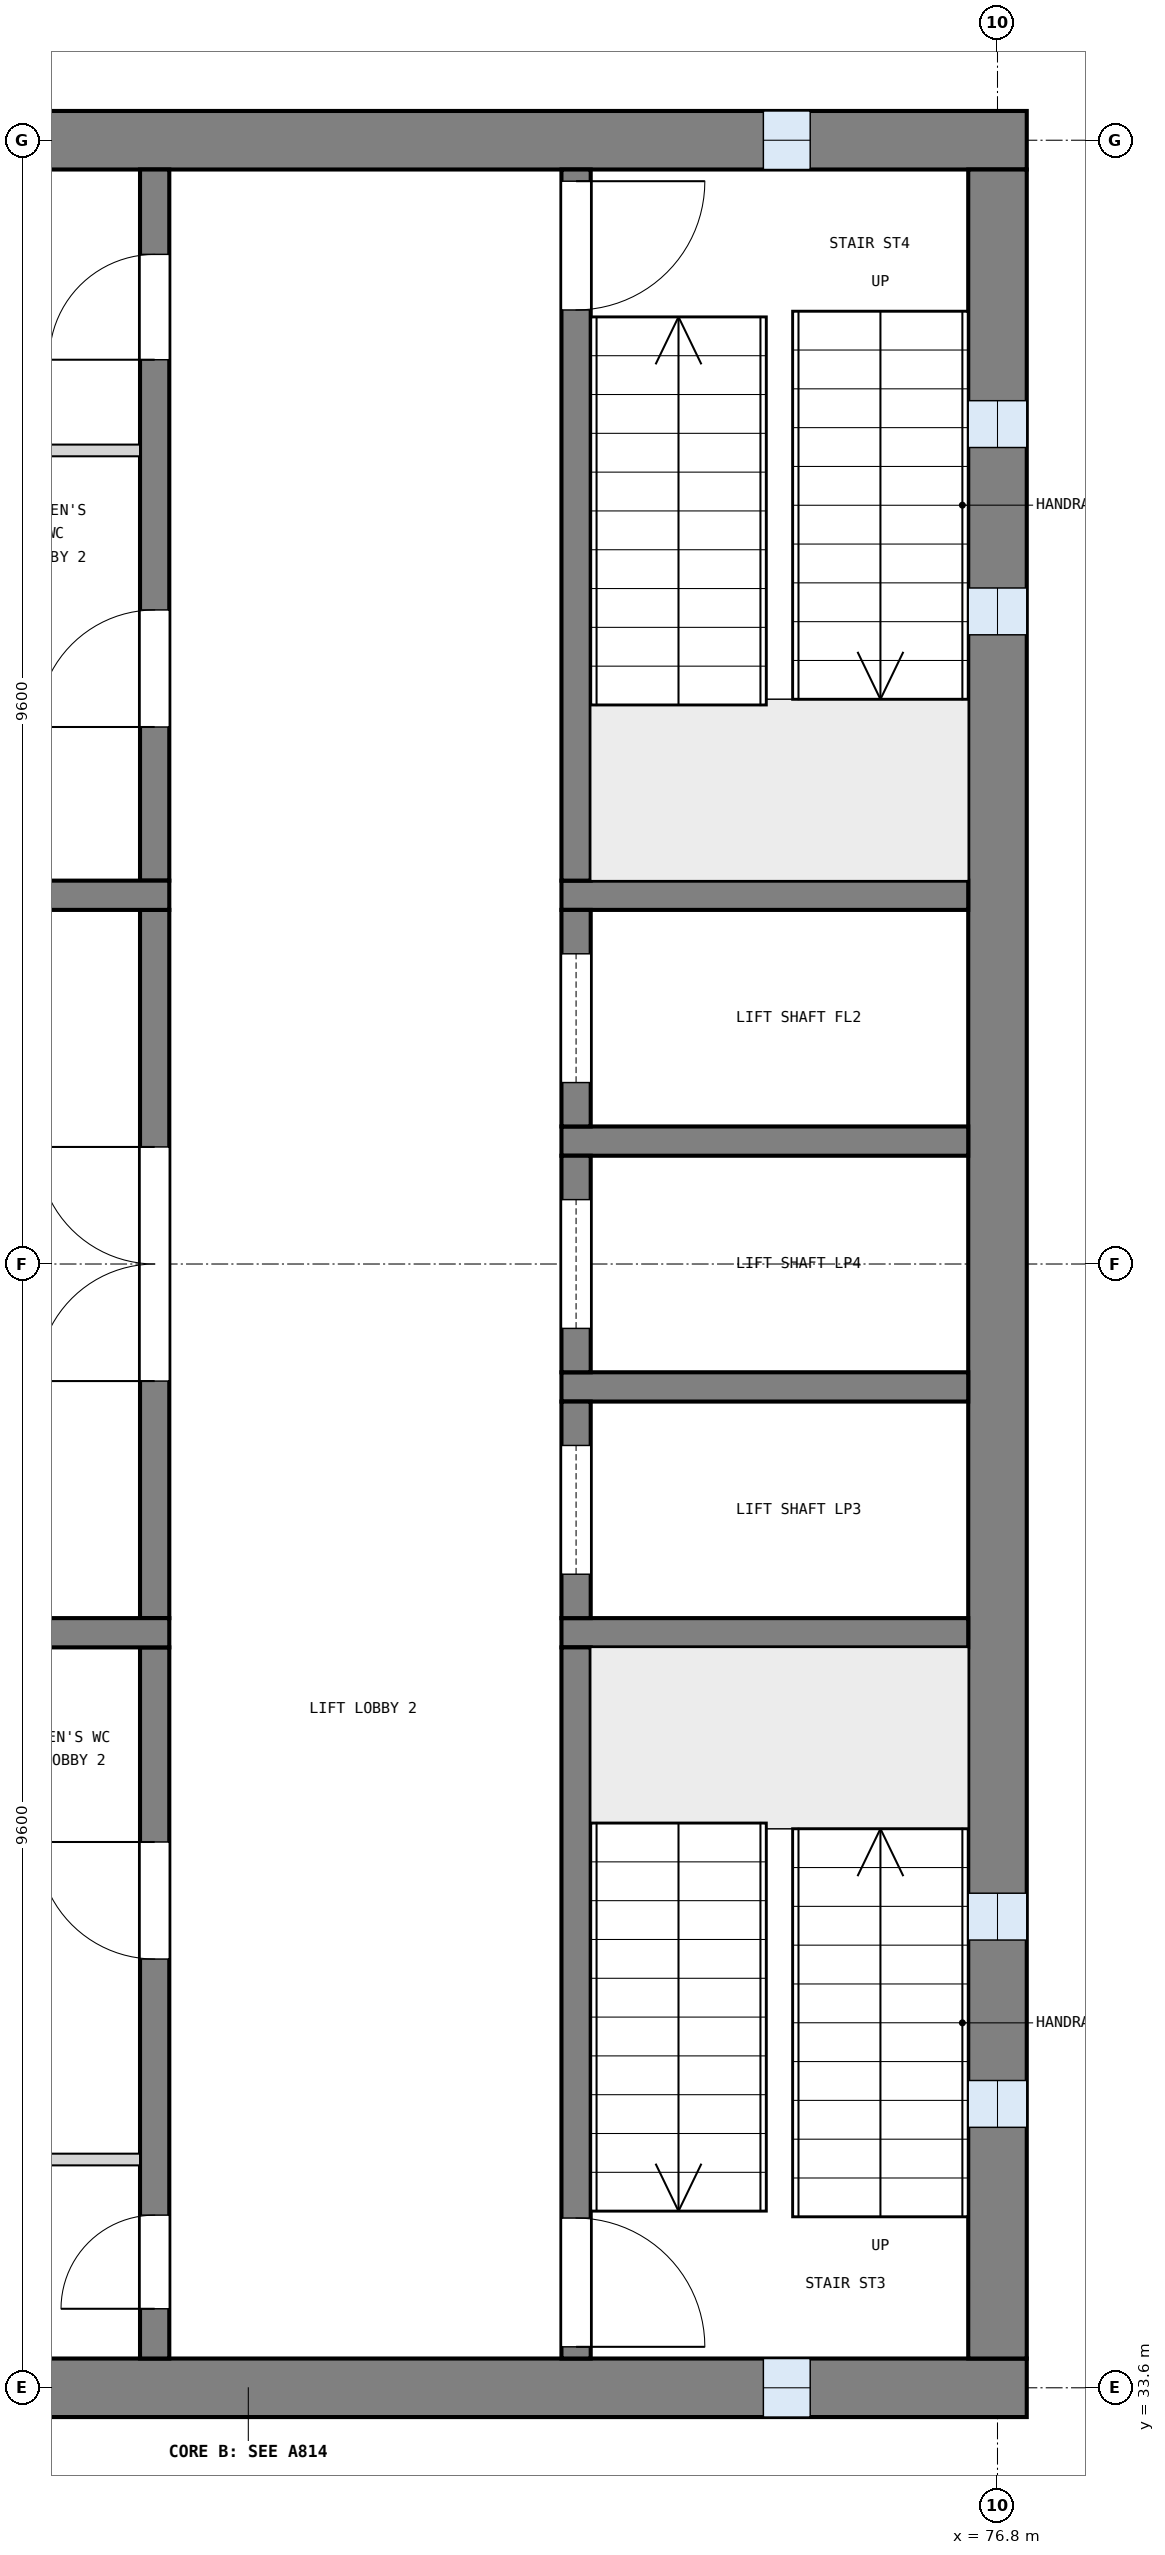
"""IFC4 building model, lengths in metres.
Left out: names, types, materials, properties, quantities, classifications, styles, units other than length and angle.
Written with IfcOpenShell. Run it as: python <this file> out.ifc"""

import sys

from ifc_helpers import new_model, si_unit, direction, frame, frame_2d, origin, place, context, subcontext, project, spatial, rectangle, extrude, element, fill, save


model = new_model("IFC4")
c1 = context("Model", 3, precision=1e-05, world=origin(), true_north=direction((0.0, 1.0)))
c2 = subcontext(c1, "Body", "Model", "MODEL_VIEW")
j1 = project(units=[si_unit("LENGTHUNIT", "METRE"), si_unit("PLANEANGLEUNIT", "RADIAN")], contexts=[c1])
p1 = place(None, origin())
s1 = spatial("IfcSite", under=j1, at=p1, CompositionType="ELEMENT")
p2 = place(p1, origin())
s2 = spatial("IfcBuilding", under=s1, at=p2, CompositionType="ELEMENT")
p3 = place(p2, frame((0.0, 0.0, 48.3)))
s3 = spatial("IfcBuildingStorey", under=s2, at=p3, CompositionType="ELEMENT", Elevation=48.3)
p4 = place(p3, frame((63.75, 52.8, 0.0), z_axis=(0.0, 0.0, 1.0), x_axis=(1.0, 0.0, 0.0)))
e1 = element("IfcWall", 1, at=p4, inside=s3, PredefinedType="SHEAR", context=c2, shape_type="SweptSolid", body=[
    extrude(rectangle(XDim=13.3, YDim=0.5, at=frame_2d((6.65, 0.0))), origin(), (0.0, 0.0, 1.0), 3.9),
])
p5 = place(p4, frame((11.05, 0.0, 1.0)))
e2 = element("IfcOpeningElement", 2, at=p5, cuts=e1, PredefinedType="OPENING", context=c2, shape_type="SweptSolid", body=[
    extrude(rectangle(XDim=0.4, YDim=2.0, at=frame_2d((0.2, 1.0))), frame((0.0, 0.26, 0.0), z_axis=(0.0, -1.0, 0.0), x_axis=(1.0, 0.0, 0.0)), (0.0, 0.0, 1.0), 0.52),
])
p6 = place(p3, frame((63.75, 33.6, 0.0), z_axis=(0.0, 0.0, 1.0), x_axis=(1.0, 0.0, 0.0)))
e3 = element("IfcWall", 3, at=p6, inside=s3, PredefinedType="SHEAR", context=c2, shape_type="SweptSolid", body=[
    extrude(rectangle(XDim=13.3, YDim=0.5, at=frame_2d((6.65, 0.0))), origin(), (0.0, 0.0, 1.0), 3.9),
])
p7 = place(p6, frame((11.05, 0.0, 1.0)))
e4 = element("IfcOpeningElement", 4, at=p7, cuts=e3, PredefinedType="OPENING", context=c2, shape_type="SweptSolid", body=[
    extrude(rectangle(XDim=0.4, YDim=2.0, at=frame_2d((0.2, 1.0))), frame((0.0, 0.26, 0.0), z_axis=(0.0, -1.0, 0.0), x_axis=(1.0, 0.0, 0.0)), (0.0, 0.0, 1.0), 0.52),
])
p8 = place(p3, frame((76.8, 33.85, 0.0), z_axis=(0.0, 0.0, 1.0), x_axis=(0.0, 1.0, 0.0)))
e5 = element("IfcWall", 5, at=p8, inside=s3, PredefinedType="SHEAR", context=c2, shape_type="SweptSolid", body=[
    extrude(rectangle(XDim=18.7, YDim=0.5, at=frame_2d((9.35, 0.0))), origin(), (0.0, 0.0, 1.0), 3.9),
])
p9 = place(p8, frame((1.975, 0.0, 1.0)))
e6 = element("IfcOpeningElement", 6, at=p9, cuts=e5, PredefinedType="OPENING", context=c2, shape_type="SweptSolid", body=[
    extrude(rectangle(XDim=0.4, YDim=2.0, at=frame_2d((0.2, 1.0))), frame((0.0, 0.26, 0.0), z_axis=(0.0, -1.0, 0.0), x_axis=(1.0, 0.0, 0.0)), (0.0, 0.0, 1.0), 0.52),
])
p10 = place(p8, frame((3.575, 0.0, 1.0)))
e7 = element("IfcOpeningElement", 7, at=p10, cuts=e5, PredefinedType="OPENING", context=c2, shape_type="SweptSolid", body=[
    extrude(rectangle(XDim=0.4, YDim=2.0, at=frame_2d((0.2, 1.0))), frame((0.0, 0.26, 0.0), z_axis=(0.0, -1.0, 0.0), x_axis=(1.0, 0.0, 0.0)), (0.0, 0.0, 1.0), 0.52),
])
p11 = place(p8, frame((14.725, 0.0, 1.0)))
e8 = element("IfcOpeningElement", 8, at=p11, cuts=e5, PredefinedType="OPENING", context=c2, shape_type="SweptSolid", body=[
    extrude(rectangle(XDim=0.4, YDim=2.0, at=frame_2d((0.2, 1.0))), frame((0.0, 0.26, 0.0), z_axis=(0.0, -1.0, 0.0), x_axis=(1.0, 0.0, 0.0)), (0.0, 0.0, 1.0), 0.52),
])
p12 = place(p8, frame((16.325, 0.0, 1.0)))
e9 = element("IfcOpeningElement", 9, at=p12, cuts=e5, PredefinedType="OPENING", context=c2, shape_type="SweptSolid", body=[
    extrude(rectangle(XDim=0.4, YDim=2.0, at=frame_2d((0.2, 1.0))), frame((0.0, 0.26, 0.0), z_axis=(0.0, -1.0, 0.0), x_axis=(1.0, 0.0, 0.0)), (0.0, 0.0, 1.0), 0.52),
])
for number, where, z_axis, x_axis in (
    (10, (76.55, 40.05, 0.0), (0.0, 0.0, 1.0), (-1.0, 0.0, 0.0)),
    (11, (76.55, 42.15, 0.0), (0.0, 0.0, 1.0), (-1.0, 0.0, 0.0)),
    (12, (76.55, 44.25, 0.0), (0.0, 0.0, 1.0), (-1.0, 0.0, 0.0)),
    (13, (76.55, 46.35, 0.0), (0.0, 0.0, 1.0), (-1.0, 0.0, 0.0)),
):
    element("IfcWall", number, at=place(p3, frame(where, z_axis=z_axis, x_axis=x_axis)), inside=s3, PredefinedType="SOLIDWALL", context=c2, shape_type="SweptSolid", body=[
        extrude(rectangle(XDim=3.475, YDim=0.25, at=frame_2d((1.738, 0.0))), origin(), (0.0, 0.0, 1.0), 3.6),
    ])
p13 = place(p3, frame((73.2, 33.85, 0.0), z_axis=(0.0, 0.0, 1.0), x_axis=(0.0, 1.0, 0.0)))
e14 = element("IfcWall", 14, at=p13, inside=s3, PredefinedType="SOLIDWALL", context=c2, shape_type="SweptSolid", body=[
    extrude(rectangle(XDim=6.075, YDim=0.25, at=frame_2d((3.038, 0.0))), origin(), (0.0, 0.0, 1.0), 3.6),
])
p14 = place(p13, frame((0.1, 0.0, 0.0)))
e15 = element("IfcOpeningElement", 15, at=p14, cuts=e14, PredefinedType="OPENING", context=c2, shape_type="SweptSolid", body=[
    extrude(rectangle(XDim=1.1, YDim=2.1, at=frame_2d((0.55, 1.05))), frame((0.0, 0.135, 0.0), z_axis=(0.0, -1.0, 0.0), x_axis=(1.0, 0.0, 0.0)), (0.0, 0.0, 1.0), 0.27),
])
p15 = place(p3, frame((73.2, 40.175, 0.0), z_axis=(0.0, 0.0, 1.0), x_axis=(0.0, 1.0, 0.0)))
e16 = element("IfcWall", 16, at=p15, inside=s3, PredefinedType="SOLIDWALL", context=c2, shape_type="SweptSolid", body=[
    extrude(rectangle(XDim=1.85, YDim=0.25, at=frame_2d((0.925, 0.0))), origin(), (0.0, 0.0, 1.0), 3.6),
])
p16 = place(p15, frame((0.375, 0.0, 0.0)))
e17 = element("IfcOpeningElement", 17, at=p16, cuts=e16, PredefinedType="OPENING", context=c2, shape_type="SweptSolid", body=[
    extrude(rectangle(XDim=1.1, YDim=2.1, at=frame_2d((0.55, 1.05))), frame((0.0, 0.135, 0.0), z_axis=(0.0, -1.0, 0.0), x_axis=(1.0, 0.0, 0.0)), (0.0, 0.0, 1.0), 0.27),
])
p17 = place(p3, frame((73.2, 42.275, 0.0), z_axis=(0.0, 0.0, 1.0), x_axis=(0.0, 1.0, 0.0)))
e18 = element("IfcWall", 18, at=p17, inside=s3, PredefinedType="SOLIDWALL", context=c2, shape_type="SweptSolid", body=[
    extrude(rectangle(XDim=1.85, YDim=0.25, at=frame_2d((0.925, 0.0))), origin(), (0.0, 0.0, 1.0), 3.6),
])
p18 = place(p17, frame((0.375, 0.0, 0.0)))
e19 = element("IfcOpeningElement", 19, at=p18, cuts=e18, PredefinedType="OPENING", context=c2, shape_type="SweptSolid", body=[
    extrude(rectangle(XDim=1.1, YDim=2.1, at=frame_2d((0.55, 1.05))), frame((0.0, 0.135, 0.0), z_axis=(0.0, -1.0, 0.0), x_axis=(1.0, 0.0, 0.0)), (0.0, 0.0, 1.0), 0.27),
])
p19 = place(p3, frame((73.2, 44.375, 0.0), z_axis=(0.0, 0.0, 1.0), x_axis=(0.0, 1.0, 0.0)))
e20 = element("IfcWall", 20, at=p19, inside=s3, PredefinedType="SOLIDWALL", context=c2, shape_type="SweptSolid", body=[
    extrude(rectangle(XDim=1.85, YDim=0.25, at=frame_2d((0.925, 0.0))), origin(), (0.0, 0.0, 1.0), 3.6),
])
p20 = place(p19, frame((0.375, 0.0, 0.0)))
e21 = element("IfcOpeningElement", 21, at=p20, cuts=e20, PredefinedType="OPENING", context=c2, shape_type="SweptSolid", body=[
    extrude(rectangle(XDim=1.1, YDim=2.1, at=frame_2d((0.55, 1.05))), frame((0.0, 0.135, 0.0), z_axis=(0.0, -1.0, 0.0), x_axis=(1.0, 0.0, 0.0)), (0.0, 0.0, 1.0), 0.27),
])
p21 = place(p3, frame((73.2, 46.475, 0.0), z_axis=(0.0, 0.0, 1.0), x_axis=(0.0, 1.0, 0.0)))
e22 = element("IfcWall", 22, at=p21, inside=s3, PredefinedType="SOLIDWALL", context=c2, shape_type="SweptSolid", body=[
    extrude(rectangle(XDim=6.075, YDim=0.25, at=frame_2d((3.038, 0.0))), origin(), (0.0, 0.0, 1.0), 3.6),
])
p22 = place(p21, frame((4.875, 0.0, 0.0)))
e23 = element("IfcOpeningElement", 23, at=p22, cuts=e22, PredefinedType="OPENING", context=c2, shape_type="SweptSolid", body=[
    extrude(rectangle(XDim=1.1, YDim=2.1, at=frame_2d((0.55, 1.05))), frame((0.0, 0.135, 0.0), z_axis=(0.0, -1.0, 0.0), x_axis=(1.0, 0.0, 0.0)), (0.0, 0.0, 1.0), 0.27),
])
p23 = place(p3, frame((69.6, 33.85, 0.0), z_axis=(0.0, 0.0, 1.0), x_axis=(0.0, 1.0, 0.0)))
e24 = element("IfcWall", 24, at=p23, inside=s3, PredefinedType="SOLIDWALL", context=c2, shape_type="SweptSolid", body=[
    extrude(rectangle(XDim=6.075, YDim=0.25, at=frame_2d((3.038, 0.0))), origin(), (0.0, 0.0, 1.0), 3.6),
])
p24 = place(p23, frame((0.425, 0.0, 0.0)))
e25 = element("IfcOpeningElement", 25, at=p24, cuts=e24, PredefinedType="OPENING", context=c2, shape_type="SweptSolid", body=[
    extrude(rectangle(XDim=0.8, YDim=2.1, at=frame_2d((0.4, 1.05))), frame((0.0, 0.135, 0.0), z_axis=(0.0, -1.0, 0.0), x_axis=(1.0, 0.0, 0.0)), (0.0, 0.0, 1.0), 0.27),
])
p25 = place(p23, frame((3.413, 0.0, 0.0)))
e26 = element("IfcOpeningElement", 26, at=p25, cuts=e24, PredefinedType="OPENING", context=c2, shape_type="SweptSolid", body=[
    extrude(rectangle(XDim=1.0, YDim=2.1, at=frame_2d((0.5, 1.05))), frame((0.0, 0.135, 0.0), z_axis=(0.0, -1.0, 0.0), x_axis=(1.0, 0.0, 0.0)), (0.0, 0.0, 1.0), 0.27),
])
p26 = place(p3, frame((69.6, 40.175, 0.0), z_axis=(0.0, 0.0, 1.0), x_axis=(0.0, 1.0, 0.0)))
e27 = element("IfcWall", 27, at=p26, inside=s3, PredefinedType="SOLIDWALL", context=c2, shape_type="SweptSolid", body=[
    extrude(rectangle(XDim=6.05, YDim=0.25, at=frame_2d((3.025, 0.0))), origin(), (0.0, 0.0, 1.0), 3.6),
])
p27 = place(p26, frame((2.025, 0.0, 0.0)))
e28 = element("IfcOpeningElement", 28, at=p27, cuts=e27, PredefinedType="OPENING", context=c2, shape_type="SweptSolid", body=[
    extrude(rectangle(XDim=2.0, YDim=2.1, at=frame_2d((1.0, 1.05))), frame((0.0, 0.135, 0.0), z_axis=(0.0, -1.0, 0.0), x_axis=(1.0, 0.0, 0.0)), (0.0, 0.0, 1.0), 0.27),
])
p28 = place(p3, frame((69.6, 46.475, 0.0), z_axis=(0.0, 0.0, 1.0), x_axis=(0.0, 1.0, 0.0)))
e29 = element("IfcWall", 29, at=p28, inside=s3, PredefinedType="SOLIDWALL", context=c2, shape_type="SweptSolid", body=[
    extrude(rectangle(XDim=6.075, YDim=0.25, at=frame_2d((3.038, 0.0))), origin(), (0.0, 0.0, 1.0), 3.6),
])
p29 = place(p28, frame((1.312, 0.0, 0.0)))
e30 = element("IfcOpeningElement", 30, at=p29, cuts=e29, PredefinedType="OPENING", context=c2, shape_type="SweptSolid", body=[
    extrude(rectangle(XDim=1.0, YDim=2.1, at=frame_2d((0.5, 1.05))), frame((0.0, 0.135, 0.0), z_axis=(0.0, -1.0, 0.0), x_axis=(1.0, 0.0, 0.0)), (0.0, 0.0, 1.0), 0.27),
])
p30 = place(p28, frame((4.45, 0.0, 0.0)))
e31 = element("IfcOpeningElement", 31, at=p30, cuts=e29, PredefinedType="OPENING", context=c2, shape_type="SweptSolid", body=[
    extrude(rectangle(XDim=0.9, YDim=2.1, at=frame_2d((0.45, 1.05))), frame((0.0, 0.135, 0.0), z_axis=(0.0, -1.0, 0.0), x_axis=(1.0, 0.0, 0.0)), (0.0, 0.0, 1.0), 0.27),
])
for number, where, z_axis, x_axis in (
    (32, (69.725, 40.05, 0.0), (0.0, 0.0, 1.0), (-1.0, 0.0, 0.0)),
    (33, (69.725, 46.35, 0.0), (0.0, 0.0, 1.0), (-1.0, 0.0, 0.0)),
):
    element("IfcWall", number, at=place(p3, frame(where, z_axis=z_axis, x_axis=x_axis)), inside=s3, PredefinedType="SOLIDWALL", context=c2, shape_type="SweptSolid", body=[
        extrude(rectangle(XDim=5.475, YDim=0.25, at=frame_2d((2.738, 0.0))), origin(), (0.0, 0.0, 1.0), 3.6),
    ])
for number, where, z_axis, x_axis in (
    (34, (69.475, 35.55, 0.0), (0.0, 0.0, 1.0), (-1.0, 0.0, 0.0)),
    (35, (69.475, 50.15, 0.0), (0.0, 0.0, 1.0), (-1.0, 0.0, 0.0)),
):
    element("IfcWall", number, at=place(p3, frame(where, z_axis=z_axis, x_axis=x_axis)), inside=s3, PredefinedType="PARTITIONING", context=c2, shape_type="SweptSolid", body=[
        extrude(rectangle(XDim=5.225, YDim=0.1, at=frame_2d((2.613, 0.0))), origin(), (0.0, 0.0, 1.0), 3.6),
    ])
p31 = place(p9, origin())
e36 = element("IfcWindow", 36, at=p31, inside=s3, PartitioningType="SINGLE_PANEL", PredefinedType="WINDOW", context=c2, shape_type="SweptSolid", body=[
    extrude(rectangle(XDim=0.4, YDim=2.0, at=frame_2d((0.2, 1.0))), frame((0.0, 0.03, 0.0), z_axis=(0.0, -1.0, 0.0), x_axis=(1.0, 0.0, 0.0)), (0.0, 0.0, 1.0), 0.06),
])
fill(e6, e36)
p32 = place(p10, origin())
e37 = element("IfcWindow", 37, at=p32, inside=s3, PartitioningType="SINGLE_PANEL", PredefinedType="WINDOW", context=c2, shape_type="SweptSolid", body=[
    extrude(rectangle(XDim=0.4, YDim=2.0, at=frame_2d((0.2, 1.0))), frame((0.0, 0.03, 0.0), z_axis=(0.0, -1.0, 0.0), x_axis=(1.0, 0.0, 0.0)), (0.0, 0.0, 1.0), 0.06),
])
fill(e7, e37)
p33 = place(p11, origin())
e38 = element("IfcWindow", 38, at=p33, inside=s3, PartitioningType="SINGLE_PANEL", PredefinedType="WINDOW", context=c2, shape_type="SweptSolid", body=[
    extrude(rectangle(XDim=0.4, YDim=2.0, at=frame_2d((0.2, 1.0))), frame((0.0, 0.03, 0.0), z_axis=(0.0, -1.0, 0.0), x_axis=(1.0, 0.0, 0.0)), (0.0, 0.0, 1.0), 0.06),
])
fill(e8, e38)
p34 = place(p12, origin())
e39 = element("IfcWindow", 39, at=p34, inside=s3, PartitioningType="SINGLE_PANEL", PredefinedType="WINDOW", context=c2, shape_type="SweptSolid", body=[
    extrude(rectangle(XDim=0.4, YDim=2.0, at=frame_2d((0.2, 1.0))), frame((0.0, 0.03, 0.0), z_axis=(0.0, -1.0, 0.0), x_axis=(1.0, 0.0, 0.0)), (0.0, 0.0, 1.0), 0.06),
])
fill(e9, e39)
p35 = place(p7, origin())
e40 = element("IfcWindow", 40, at=p35, inside=s3, PartitioningType="SINGLE_PANEL", PredefinedType="WINDOW", context=c2, shape_type="SweptSolid", body=[
    extrude(rectangle(XDim=0.4, YDim=2.0, at=frame_2d((0.2, 1.0))), frame((0.0, 0.03, 0.0), z_axis=(0.0, -1.0, 0.0), x_axis=(1.0, 0.0, 0.0)), (0.0, 0.0, 1.0), 0.06),
])
fill(e4, e40)
p36 = place(p5, origin())
e41 = element("IfcWindow", 41, at=p36, inside=s3, PartitioningType="SINGLE_PANEL", PredefinedType="WINDOW", context=c2, shape_type="SweptSolid", body=[
    extrude(rectangle(XDim=0.4, YDim=2.0, at=frame_2d((0.2, 1.0))), frame((0.0, 0.03, 0.0), z_axis=(0.0, -1.0, 0.0), x_axis=(1.0, 0.0, 0.0)), (0.0, 0.0, 1.0), 0.06),
])
fill(e2, e41)
p37 = place(p14, frame((1.1, 0.0, 0.0), z_axis=(0.0, 0.0, 1.0), x_axis=(-1.0, 0.0, 0.0)))
e42 = element("IfcDoor", 42, at=p37, inside=s3, OperationType="SINGLE_SWING_RIGHT", PredefinedType="DOOR", context=c2, shape_type="SweptSolid", body=[
    extrude(rectangle(XDim=1.1, YDim=2.1, at=frame_2d((0.55, 1.05))), frame((0.0, 0.025, 0.0), z_axis=(0.0, -1.0, 0.0), x_axis=(1.0, 0.0, 0.0)), (0.0, 0.0, 1.0), 0.05),
])
fill(e15, e42)
p38 = place(p22, frame((1.1, 0.0, 0.0), z_axis=(0.0, 0.0, 1.0), x_axis=(-1.0, 0.0, 0.0)))
e43 = element("IfcDoor", 43, at=p38, inside=s3, OperationType="SINGLE_SWING_LEFT", PredefinedType="DOOR", context=c2, shape_type="SweptSolid", body=[
    extrude(rectangle(XDim=1.1, YDim=2.1, at=frame_2d((0.55, 1.05))), frame((0.0, 0.025, 0.0), z_axis=(0.0, -1.0, 0.0), x_axis=(1.0, 0.0, 0.0)), (0.0, 0.0, 1.0), 0.05),
])
fill(e23, e43)
p39 = place(p16, origin())
e44 = element("IfcDoor", 44, at=p39, inside=s3, OperationType="SLIDING_TO_LEFT", PredefinedType="DOOR", context=c2, shape_type="SweptSolid", body=[
    extrude(rectangle(XDim=1.1, YDim=2.1, at=frame_2d((0.55, 1.05))), frame((0.0, 0.025, 0.0), z_axis=(0.0, -1.0, 0.0), x_axis=(1.0, 0.0, 0.0)), (0.0, 0.0, 1.0), 0.05),
])
fill(e17, e44)
p40 = place(p18, origin())
e45 = element("IfcDoor", 45, at=p40, inside=s3, OperationType="SLIDING_TO_LEFT", PredefinedType="DOOR", context=c2, shape_type="SweptSolid", body=[
    extrude(rectangle(XDim=1.1, YDim=2.1, at=frame_2d((0.55, 1.05))), frame((0.0, 0.025, 0.0), z_axis=(0.0, -1.0, 0.0), x_axis=(1.0, 0.0, 0.0)), (0.0, 0.0, 1.0), 0.05),
])
fill(e19, e45)
p41 = place(p20, origin())
e46 = element("IfcDoor", 46, at=p41, inside=s3, OperationType="SLIDING_TO_LEFT", PredefinedType="DOOR", context=c2, shape_type="SweptSolid", body=[
    extrude(rectangle(XDim=1.1, YDim=2.1, at=frame_2d((0.55, 1.05))), frame((0.0, 0.025, 0.0), z_axis=(0.0, -1.0, 0.0), x_axis=(1.0, 0.0, 0.0)), (0.0, 0.0, 1.0), 0.05),
])
fill(e21, e46)
p42 = place(p27, origin())
e47 = element("IfcDoor", 47, at=p42, inside=s3, OperationType="DOUBLE_DOOR_SINGLE_SWING", PredefinedType="DOOR", context=c2, shape_type="SweptSolid", body=[
    extrude(rectangle(XDim=2.0, YDim=2.1, at=frame_2d((1.0, 1.05))), frame((0.0, 0.025, 0.0), z_axis=(0.0, -1.0, 0.0), x_axis=(1.0, 0.0, 0.0)), (0.0, 0.0, 1.0), 0.05),
])
fill(e28, e47)
p43 = place(p24, origin())
e48 = element("IfcDoor", 48, at=p43, inside=s3, OperationType="SINGLE_SWING_LEFT", PredefinedType="DOOR", context=c2, shape_type="SweptSolid", body=[
    extrude(rectangle(XDim=0.8, YDim=2.1, at=frame_2d((0.4, 1.05))), frame((0.0, 0.025, 0.0), z_axis=(0.0, -1.0, 0.0), x_axis=(1.0, 0.0, 0.0)), (0.0, 0.0, 1.0), 0.05),
])
fill(e25, e48)
p44 = place(p25, origin())
e49 = element("IfcDoor", 49, at=p44, inside=s3, OperationType="SINGLE_SWING_RIGHT", PredefinedType="DOOR", context=c2, shape_type="SweptSolid", body=[
    extrude(rectangle(XDim=1.0, YDim=2.1, at=frame_2d((0.5, 1.05))), frame((0.0, 0.025, 0.0), z_axis=(0.0, -1.0, 0.0), x_axis=(1.0, 0.0, 0.0)), (0.0, 0.0, 1.0), 0.05),
])
fill(e26, e49)
p45 = place(p29, origin())
e50 = element("IfcDoor", 50, at=p45, inside=s3, OperationType="SINGLE_SWING_LEFT", PredefinedType="DOOR", context=c2, shape_type="SweptSolid", body=[
    extrude(rectangle(XDim=1.0, YDim=2.1, at=frame_2d((0.5, 1.05))), frame((0.0, 0.025, 0.0), z_axis=(0.0, -1.0, 0.0), x_axis=(1.0, 0.0, 0.0)), (0.0, 0.0, 1.0), 0.05),
])
fill(e30, e50)
p46 = place(p30, origin())
e51 = element("IfcDoor", 51, at=p46, inside=s3, OperationType="SINGLE_SWING_LEFT", PredefinedType="DOOR", context=c2, shape_type="SweptSolid", body=[
    extrude(rectangle(XDim=0.9, YDim=2.1, at=frame_2d((0.45, 1.05))), frame((0.0, 0.025, 0.0), z_axis=(0.0, -1.0, 0.0), x_axis=(1.0, 0.0, 0.0)), (0.0, 0.0, 1.0), 0.05),
])
fill(e31, e51)
save(model, sys.argv[1])
